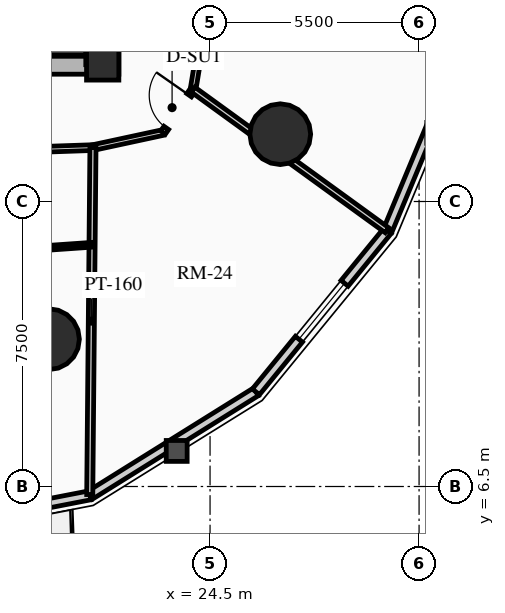
"""IFC4 building model, lengths in metres.
Left out: names, types, materials, properties, quantities, classifications, styles, units other than length and angle.
Written with IfcOpenShell. Run it as: python <this file> out.ifc"""

import sys

from ifc_helpers import new_model, si_unit, direction, frame, frame_2d, origin, origin_2d, place, context, subcontext, project, spatial, rectangle, circle, extrude, source, transform, mapped, element, fill, save


model = new_model("IFC4")
c1 = context("Model", 3, precision=1e-05, world=origin(), true_north=direction((0.0, 1.0)))
c2 = subcontext(c1, "Body", "Model", "MODEL_VIEW")
j1 = project(units=[si_unit("LENGTHUNIT", "METRE"), si_unit("PLANEANGLEUNIT", "RADIAN")], contexts=[c1])
p1 = place(None, origin())
s1 = spatial("IfcSite", under=j1, at=p1, CompositionType="ELEMENT")
p2 = place(p1, origin())
s2 = spatial("IfcBuilding", under=s1, at=p2, CompositionType="ELEMENT")
p3 = place(p2, frame((0.0, 0.0, 51.1)))
s3 = spatial("IfcBuildingStorey", under=s2, at=p3, CompositionType="ELEMENT", Elevation=51.1)
p4 = place(p3, frame((21.85, 17.35, 0.0), z_axis=(0.0, 0.0, 1.0), x_axis=(0.0, 1.0, 0.0)))
e1 = element("IfcWall", 1, at=p4, inside=s3, PredefinedType="SHEAR", context=c2, shape_type="SweptSolid", body=[
    extrude(rectangle(XDim=14.3, YDim=0.5, at=frame_2d((7.15, 0.0))), origin(), (0.0, 0.0, 1.0), 2.91),
])
p5 = place(p3, frame((11.15, 17.6, 0.0), z_axis=(0.0, 0.0, 1.0), x_axis=(1.0, 0.0, 0.0)))
e2 = element("IfcWall", 2, at=p5, inside=s3, PredefinedType="SHEAR", context=c2, shape_type="SweptSolid", body=[
    extrude(rectangle(XDim=10.7, YDim=0.5, at=frame_2d((5.35, 0.0))), origin(), (0.0, 0.0, 1.0), 2.91),
])
m1 = source(origin(), c2, "Body", "SweptSolid", [
    extrude(rectangle(XDim=1.5, YDim=2.02, at=frame_2d((0.75, 1.01))), frame((0.0, 0.26, 0.0), z_axis=(0.0, -1.0, 0.0), x_axis=(1.0, 0.0, 0.0)), (0.0, 0.0, 1.0), 0.52),
])
p6 = place(p5, frame((5.45, 0.0, 0.0)))
e3 = element("IfcOpeningElement", 3, at=p6, cuts=e2, PredefinedType="OPENING", context=c2, shape_type="MappedRepresentation", body=[
    mapped(m1, transform((0.0, 0.0, 0.0), x_axis=(1.0, 0.0, 0.0), y_axis=(0.0, 1.0, 0.0), z_axis=(0.0, 0.0, 1.0), scale=1.0)),
])
p7 = place(p3, frame((21.405, 17.6, 0.0), z_axis=(0.0, 0.0, 1.0), x_axis=(0.0, 1.0, 0.0)))
e4 = element("IfcWall", 4, at=p7, inside=s3, PredefinedType="SHEAR", context=c2, shape_type="SweptSolid", body=[
    extrude(rectangle(XDim=6.745, YDim=0.35, at=frame_2d((3.373, 0.0))), origin(), (0.0, 0.0, 1.0), 2.91),
])
p8 = place(p3, frame((21.675, 17.62, 0.0), z_axis=(0.0, 0.0, 1.0), x_axis=(1.0, 0.0, 0.0)))
e5 = element("IfcColumn", 5, at=p8, inside=s3, PredefinedType="COLUMN", context=c2, shape_type="SweptSolid", body=[
    extrude(rectangle(XDim=0.85, YDim=0.85, at=origin_2d()), origin(), (0.0, 0.0, 1.0), 2.91),
])
for number, where, z_axis, x_axis in (
    (6, (20.261, 10.377, 0.0), (0.0, 0.0, 1.0), (1.0, 0.0, 0.0)),
    (7, (26.347, 15.771, 0.0), (0.0, 0.0, 1.0), (1.0, 0.0, 0.0)),
):
    element("IfcColumn", number, at=place(p3, frame(where, z_axis=z_axis, x_axis=x_axis)), inside=s3, PredefinedType="USERDEFINED", context=c2, shape_type="SweptSolid", body=[
        extrude(circle(Radius=0.8, at=origin_2d()), origin(), (0.0, 0.0, 1.0), 2.91),
    ])
p9 = place(p3, frame((21.34, 6.268, 0.0), z_axis=(0.0, 0.0, 1.0), x_axis=(-0.981725274071, -0.190303668512, 0.0)))
e8 = element("IfcWall", 8, at=p9, inside=s3, PredefinedType="SOLIDWALL", context=c2, shape_type="SweptSolid", body=[
    extrude(rectangle(XDim=4.93, YDim=0.24, at=frame_2d((2.465, 0.0))), origin(), (0.0, 0.0, 1.0), 2.073),
])
m2 = source(origin(), c2, "Body", "SweptSolid", [
    extrude(rectangle(XDim=1.15, YDim=2.005, at=frame_2d((0.575, 1.002))), frame((0.0, 0.13, 0.0), z_axis=(0.0, -1.0, 0.0), x_axis=(1.0, 0.0, 0.0)), (0.0, 0.0, 1.0), 0.26),
])
p10 = place(p9, frame((1.89, 0.0, 0.0)))
e9 = element("IfcOpeningElement", 9, at=p10, cuts=e8, PredefinedType="OPENING", context=c2, shape_type="MappedRepresentation", body=[
    mapped(m2, transform((0.0, 0.0, 0.0), x_axis=(1.0, 0.0, 0.0), y_axis=(0.0, 1.0, 0.0), z_axis=(0.0, 0.0, 1.0), scale=1.0)),
])
p11 = place(p3, frame((25.707, 8.991, 0.0), z_axis=(0.0, 0.0, 1.0), x_axis=(-0.848533613342, -0.529141481107, 0.0)))
e10 = element("IfcWall", 10, at=p11, inside=s3, PredefinedType="SOLIDWALL", context=c2, shape_type="SweptSolid", body=[
    extrude(rectangle(XDim=5.146, YDim=0.24, at=frame_2d((2.573, 0.0))), origin(), (0.0, 0.0, 1.0), 2.073),
])
p12 = place(p3, frame((29.172, 13.232, 0.0), z_axis=(0.0, 0.0, 1.0), x_axis=(-0.632713287022, -0.77438614168, 0.0)))
e11 = element("IfcWall", 11, at=p12, inside=s3, PredefinedType="SOLIDWALL", context=c2, shape_type="SweptSolid", body=[
    extrude(rectangle(XDim=5.477, YDim=0.24, at=frame_2d((2.738, 0.0))), origin(), (0.0, 0.0, 1.0), 2.073),
])
m3 = source(origin(), c2, "Body", "SweptSolid", [
    extrude(rectangle(XDim=1.9, YDim=1.35, at=frame_2d((0.95, 0.675))), frame((0.0, 0.13, 0.0), z_axis=(0.0, -1.0, 0.0), x_axis=(1.0, 0.0, 0.0)), (0.0, 0.0, 1.0), 0.26),
])
p13 = place(p12, frame((1.788, 0.0, 0.65)))
e12 = element("IfcOpeningElement", 12, at=p13, cuts=e11, PredefinedType="OPENING", context=c2, shape_type="MappedRepresentation", body=[
    mapped(m3, transform((0.0, 0.0, 0.0), x_axis=(1.0, 0.0, 0.0), y_axis=(0.0, 1.0, 0.0), z_axis=(0.0, 0.0, 1.0), scale=1.0)),
])
p14 = place(p3, frame((31.396, 18.576, 0.0), z_axis=(0.0, 0.0, 1.0), x_axis=(-0.384348836956, -0.923187939442, 0.0)))
e13 = element("IfcWall", 13, at=p14, inside=s3, PredefinedType="SOLIDWALL", context=c2, shape_type="SweptSolid", body=[
    extrude(rectangle(XDim=5.789, YDim=0.24, at=frame_2d((2.894, 0.0))), origin(), (0.0, 0.0, 1.0), 2.073),
])
p15 = place(p3, frame((14.781, 15.191, 0.0), z_axis=(0.0, 0.0, 1.0), x_axis=(0.999412963972, 0.034259705842, 0.0)))
e14 = element("IfcWall", 14, at=p15, inside=s3, PredefinedType="PARTITIONING", context=c2, shape_type="SweptSolid", body=[
    extrude(rectangle(XDim=6.642, YDim=0.15, at=frame_2d((3.321, 0.0))), origin(), (0.0, 0.0, 1.0), 2.159),
])
p16 = place(p3, frame((21.419, 15.418, 0.0), z_axis=(0.0, 0.0, 1.0), x_axis=(0.977540384091, 0.210748184977, 0.0)))
e15 = element("IfcWall", 15, at=p16, inside=s3, PredefinedType="PARTITIONING", context=c2, shape_type="SweptSolid", body=[
    extrude(rectangle(XDim=1.887, YDim=0.15, at=frame_2d((0.944, 0.0))), origin(), (0.0, 0.0, 1.0), 2.205),
])
p17 = place(p3, frame((23.263, 15.816, 0.0), z_axis=(0.0, 0.0, 1.0), x_axis=(0.572652947117, 0.819797903241, 0.0)))
e16 = element("IfcWall", 16, at=p17, inside=s3, PredefinedType="PARTITIONING", context=c2, shape_type="SweptSolid", body=[
    extrude(rectangle(XDim=1.377, YDim=0.15, at=frame_2d((0.688, 0.0))), origin(), (0.0, 0.0, 1.0), 2.159),
])
m4 = source(origin(), c2, "Body", "SweptSolid", [
    extrude(rectangle(XDim=1.05, YDim=2.015, at=frame_2d((0.525, 1.007))), frame((0.0, 0.085, 0.0), z_axis=(0.0, -1.0, 0.0), x_axis=(1.0, 0.0, 0.0)), (0.0, 0.0, 1.0), 0.17),
])
p18 = place(p17, frame((0.147, 0.0, 0.0)))
e17 = element("IfcOpeningElement", 17, at=p18, cuts=e16, PredefinedType="OPENING", context=c2, shape_type="MappedRepresentation", body=[
    mapped(m4, transform((0.0, 0.0, 0.0), x_axis=(1.0, 0.0, 0.0), y_axis=(0.0, 1.0, 0.0), z_axis=(0.0, 0.0, 1.0), scale=1.0)),
])
p19 = place(p3, frame((24.052, 16.945, 0.0), z_axis=(0.0, 0.0, 1.0), x_axis=(0.162869842843, 0.986647563364, 0.0)))
e18 = element("IfcWall", 18, at=p19, inside=s3, PredefinedType="PARTITIONING", context=c2, shape_type="SweptSolid", body=[
    extrude(rectangle(XDim=1.605, YDim=0.15, at=frame_2d((0.803, 0.0))), origin(), (0.0, 0.0, 1.0), 2.205),
])
p20 = place(p3, frame((21.419, 15.418, 0.0), z_axis=(0.0, 0.0, 1.0), x_axis=(-0.009277675551, -0.999956961442, 0.0)))
e19 = element("IfcWall", 19, at=p20, inside=s3, PredefinedType="PARTITIONING", context=c2, shape_type="SweptSolid", body=[
    extrude(rectangle(XDim=9.131, YDim=0.16, at=frame_2d((4.566, 0.0))), origin(), (0.0, 0.0, 1.0), 2.073),
])
p21 = place(p3, frame((24.052, 16.945, 0.0), z_axis=(0.0, 0.0, 1.0), x_axis=(0.809544185493, -0.587058950817, 0.0)))
e20 = element("IfcWall", 20, at=p21, inside=s3, PredefinedType="PARTITIONING", context=c2, shape_type="SweptSolid", body=[
    extrude(rectangle(XDim=6.304, YDim=0.16, at=frame_2d((3.152, 0.0))), origin(), (0.0, 0.0, 1.0), 2.073),
])
p22 = place(p3, frame((15.262, 12.435, 0.0), z_axis=(0.0, 0.0, 1.0), x_axis=(0.997593149667, 0.069339077998, 0.0)))
e21 = element("IfcWall", 21, at=p22, inside=s3, PredefinedType="PARTITIONING", context=c2, shape_type="SweptSolid", body=[
    extrude(rectangle(XDim=6.148, YDim=0.125, at=frame_2d((3.074, 0.0))), origin(), (0.0, 0.0, 1.0), 2.159),
])
m5 = source(origin(), c2, "Body", "SweptSolid", [
    extrude(rectangle(XDim=0.9, YDim=2.005, at=frame_2d((0.45, 1.002))), frame((0.0, 0.073, 0.0), z_axis=(0.0, -1.0, 0.0), x_axis=(1.0, 0.0, 0.0)), (0.0, 0.0, 1.0), 0.145),
])
p23 = place(p22, frame((1.372, 0.0, 0.0)))
e22 = element("IfcOpeningElement", 22, at=p23, cuts=e21, PredefinedType="OPENING", context=c2, shape_type="MappedRepresentation", body=[
    mapped(m5, transform((0.0, 0.0, 0.0), x_axis=(1.0, 0.0, 0.0), y_axis=(0.0, 1.0, 0.0), z_axis=(0.0, 0.0, 1.0), scale=1.0)),
])
m6 = source(origin(), c2, "Body", "SweptSolid", [
    extrude(rectangle(XDim=1.9, YDim=1.35, at=frame_2d((0.95, 0.675))), frame((0.0, 0.03, 0.0), z_axis=(0.0, -1.0, 0.0), x_axis=(1.0, 0.0, 0.0)), (0.0, 0.0, 1.0), 0.06),
])
p24 = place(p13, origin())
e23 = element("IfcWindow", 23, at=p24, inside=s3, PartitioningType="DOUBLE_PANEL_VERTICAL", PredefinedType="WINDOW", context=c2, shape_type="MappedRepresentation", body=[
    mapped(m6, transform((0.0, 0.0, 0.0), x_axis=(1.0, 0.0, 0.0), y_axis=(0.0, 1.0, 0.0), z_axis=(0.0, 0.0, 1.0), scale=1.0)),
])
fill(e12, e23)
m7 = source(origin(), c2, "Body", "SweptSolid", [
    extrude(rectangle(XDim=1.05, YDim=2.015, at=frame_2d((0.525, 1.007))), frame((0.0, 0.025, 0.0), z_axis=(0.0, -1.0, 0.0), x_axis=(1.0, 0.0, 0.0)), (0.0, 0.0, 1.0), 0.05),
])
p25 = place(p18, origin())
e24 = element("IfcDoor", 24, at=p25, inside=s3, OperationType="SINGLE_SWING_RIGHT", PredefinedType="DOOR", context=c2, shape_type="MappedRepresentation", body=[
    mapped(m7, transform((0.0, 0.0, 0.0), x_axis=(1.0, 0.0, 0.0), y_axis=(0.0, 1.0, 0.0), z_axis=(0.0, 0.0, 1.0), scale=1.0)),
])
fill(e17, e24)
save(model, sys.argv[1])
